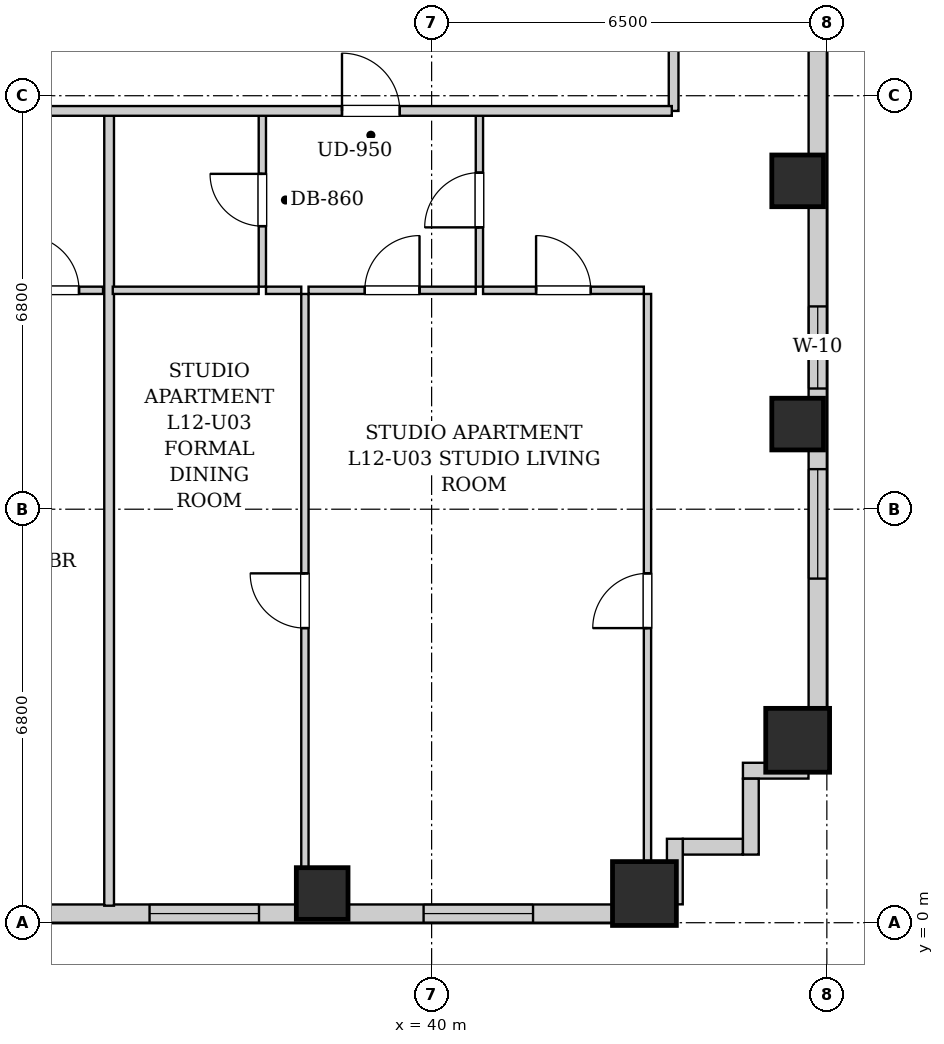
"""IFC4 building model, lengths in metres.
Left out: names, types, materials, properties, quantities, classifications, styles, units other than length and angle.
Written with IfcOpenShell. Run it as: python <this file> out.ifc"""

import sys

from ifc_helpers import new_model, si_unit, direction, frame, frame_2d, origin, origin_2d, place, context, subcontext, project, spatial, rectangle, extrude, element, fill, save


model = new_model("IFC4")
c1 = context("Model", 3, precision=1e-05, world=origin(), true_north=direction((0.0, 1.0)))
c2 = subcontext(c1, "Body", "Model", "MODEL_VIEW")
j1 = project(units=[si_unit("LENGTHUNIT", "METRE"), si_unit("PLANEANGLEUNIT", "RADIAN")], contexts=[c1])
p1 = place(None, origin())
s1 = spatial("IfcSite", under=j1, at=p1, CompositionType="ELEMENT")
p2 = place(p1, origin())
s2 = spatial("IfcBuilding", under=s1, at=p2, CompositionType="ELEMENT")
p3 = place(p2, frame((0.0, 0.0, 48.2)))
s3 = spatial("IfcBuildingStorey", under=s2, at=p3, CompositionType="ELEMENT", Elevation=48.2)
p4 = place(p3, frame((38.2, 0.48, 0.0), z_axis=(0.0, 0.0, 1.0), x_axis=(1.0, 0.0, 0.0)))
e1 = element("IfcColumn", 1, at=p4, inside=s3, PredefinedType="COLUMN", context=c2, shape_type="SweptSolid", body=[
    extrude(rectangle(XDim=0.85, YDim=0.85, at=origin_2d()), origin(), (0.0, 0.0, 1.0), 3.2),
])
for number, where, z_axis, x_axis in (
    (2, (43.5, 0.48, 0.0), (0.0, 0.0, 1.0), (1.0, 0.0, 0.0)),
    (3, (46.02, 3.0, 0.0), (0.0, 0.0, 1.0), (1.0, 0.0, 0.0)),
):
    element("IfcColumn", number, at=place(p3, frame(where, z_axis=z_axis, x_axis=x_axis)), inside=s3, PredefinedType="COLUMN", context=c2, shape_type="SweptSolid", body=[
        extrude(rectangle(XDim=1.05, YDim=1.05, at=origin_2d()), origin(), (0.0, 0.0, 1.0), 3.2),
    ])
for number, where, z_axis, x_axis in (
    (4, (46.02, 8.2, 0.0), (0.0, 0.0, 1.0), (1.0, 0.0, 0.0)),
    (5, (46.02, 12.2, 0.0), (0.0, 0.0, 1.0), (1.0, 0.0, 0.0)),
):
    element("IfcColumn", number, at=place(p3, frame(where, z_axis=z_axis, x_axis=x_axis)), inside=s3, PredefinedType="COLUMN", context=c2, shape_type="SweptSolid", body=[
        extrude(rectangle(XDim=0.85, YDim=0.85, at=origin_2d()), origin(), (0.0, 0.0, 1.0), 3.2),
    ])
p5 = place(p3, frame((46.35, 24.6, 0.0), z_axis=(0.0, 0.0, 1.0), x_axis=(0.0, -1.0, 0.0)))
e6 = element("IfcWall", 6, at=p5, inside=s3, PredefinedType="SOLIDWALL", context=c2, shape_type="SweptSolid", body=[
    extrude(rectangle(XDim=22.1, YDim=0.3, at=frame_2d((11.05, 0.0))), origin(), (0.0, 0.0, 1.0), 1.975),
])
p6 = place(p5, frame((17.141, 0.0, 0.55)))
e7 = element("IfcOpeningElement", 7, at=p6, cuts=e6, PredefinedType="OPENING", context=c2, shape_type="SweptSolid", body=[
    extrude(rectangle(XDim=1.8, YDim=1.2, at=frame_2d((0.9, 0.6))), frame((0.0, 0.16, 0.0), z_axis=(0.0, -1.0, 0.0), x_axis=(1.0, 0.0, 0.0)), (0.0, 0.0, 1.0), 0.32),
])
p7 = place(p5, frame((14.465, 0.0, 0.55)))
e8 = element("IfcOpeningElement", 8, at=p7, cuts=e6, PredefinedType="OPENING", context=c2, shape_type="SweptSolid", body=[
    extrude(rectangle(XDim=1.35, YDim=1.2, at=frame_2d((0.675, 0.6))), frame((0.0, 0.16, 0.0), z_axis=(0.0, -1.0, 0.0), x_axis=(1.0, 0.0, 0.0)), (0.0, 0.0, 1.0), 0.32),
])
p8 = place(p5, frame((5.1, 0.0, 0.55)))
e9 = element("IfcOpeningElement", 9, at=p8, cuts=e6, PredefinedType="OPENING", context=c2, shape_type="SweptSolid", body=[
    extrude(rectangle(XDim=1.8, YDim=1.2, at=frame_2d((0.9, 0.6))), frame((0.0, 0.16, 0.0), z_axis=(0.0, -1.0, 0.0), x_axis=(1.0, 0.0, 0.0)), (0.0, 0.0, 1.0), 0.32),
])
p9 = place(p5, frame((7.16, 0.0, 0.55)))
e10 = element("IfcOpeningElement", 10, at=p9, cuts=e6, PredefinedType="OPENING", context=c2, shape_type="SweptSolid", body=[
    extrude(rectangle(XDim=1.35, YDim=1.2, at=frame_2d((0.675, 0.6))), frame((0.0, 0.16, 0.0), z_axis=(0.0, -1.0, 0.0), x_axis=(1.0, 0.0, 0.0)), (0.0, 0.0, 1.0), 0.32),
])
p10 = place(p3, frame((44.0, 0.15, 0.0), z_axis=(0.0, 0.0, 1.0), x_axis=(-1.0, 0.0, 0.0)))
e11 = element("IfcWall", 11, at=p10, inside=s3, PredefinedType="SOLIDWALL", context=c2, shape_type="SweptSolid", body=[
    extrude(rectangle(XDim=26.15, YDim=0.3, at=frame_2d((13.075, 0.0))), origin(), (0.0, 0.0, 1.0), 1.975),
])
p11 = place(p10, frame((22.47, 0.0, 0.55)))
e12 = element("IfcOpeningElement", 12, at=p11, cuts=e11, PredefinedType="OPENING", context=c2, shape_type="SweptSolid", body=[
    extrude(rectangle(XDim=1.8, YDim=1.2, at=frame_2d((0.9, 0.6))), frame((0.0, 0.16, 0.0), z_axis=(0.0, -1.0, 0.0), x_axis=(1.0, 0.0, 0.0)), (0.0, 0.0, 1.0), 0.32),
])
p12 = place(p10, frame((14.354, 0.0, 0.55)))
e13 = element("IfcOpeningElement", 13, at=p12, cuts=e11, PredefinedType="OPENING", context=c2, shape_type="SweptSolid", body=[
    extrude(rectangle(XDim=1.8, YDim=1.2, at=frame_2d((0.9, 0.6))), frame((0.0, 0.16, 0.0), z_axis=(0.0, -1.0, 0.0), x_axis=(1.0, 0.0, 0.0)), (0.0, 0.0, 1.0), 0.32),
])
p13 = place(p10, frame((11.385, 0.0, 0.55)))
e14 = element("IfcOpeningElement", 14, at=p13, cuts=e11, PredefinedType="OPENING", context=c2, shape_type="SweptSolid", body=[
    extrude(rectangle(XDim=1.35, YDim=1.2, at=frame_2d((0.675, 0.6))), frame((0.0, 0.16, 0.0), z_axis=(0.0, -1.0, 0.0), x_axis=(1.0, 0.0, 0.0)), (0.0, 0.0, 1.0), 0.32),
])
p14 = place(p10, frame((6.839, 0.0, 0.55)))
e15 = element("IfcOpeningElement", 15, at=p14, cuts=e11, PredefinedType="OPENING", context=c2, shape_type="SweptSolid", body=[
    extrude(rectangle(XDim=1.8, YDim=1.2, at=frame_2d((0.9, 0.6))), frame((0.0, 0.16, 0.0), z_axis=(0.0, -1.0, 0.0), x_axis=(1.0, 0.0, 0.0)), (0.0, 0.0, 1.0), 0.32),
])
p15 = place(p10, frame((2.332, 0.0, 0.55)))
e16 = element("IfcOpeningElement", 16, at=p15, cuts=e11, PredefinedType="OPENING", context=c2, shape_type="SweptSolid", body=[
    extrude(rectangle(XDim=1.8, YDim=1.2, at=frame_2d((0.9, 0.6))), frame((0.0, 0.16, 0.0), z_axis=(0.0, -1.0, 0.0), x_axis=(1.0, 0.0, 0.0)), (0.0, 0.0, 1.0), 0.32),
])
p16 = place(p3, frame((46.198, 2.5, 0.0), z_axis=(0.0, 0.0, 1.0), x_axis=(-1.0, 0.0, 0.0)))
e17 = element("IfcWall", 17, at=p16, inside=s3, PredefinedType="SOLIDWALL", context=c2, shape_type="SweptSolid", body=[
    extrude(rectangle(XDim=1.078, YDim=0.26, at=frame_2d((0.539, 0.0))), origin(), (0.0, 0.0, 1.0), 2.94),
])
p17 = place(p3, frame((45.25, 2.368, 0.0), z_axis=(0.0, 0.0, 1.0), x_axis=(0.0, -1.0, 0.0)))
e18 = element("IfcWall", 18, at=p17, inside=s3, PredefinedType="SOLIDWALL", context=c2, shape_type="SweptSolid", body=[
    extrude(rectangle(XDim=1.248, YDim=0.26, at=frame_2d((0.624, 0.0))), origin(), (0.0, 0.0, 1.0), 2.94),
])
p18 = place(p3, frame((45.118, 1.25, 0.0), z_axis=(0.0, 0.0, 1.0), x_axis=(-1.0, 0.0, 0.0)))
e19 = element("IfcWall", 19, at=p18, inside=s3, PredefinedType="SOLIDWALL", context=c2, shape_type="SweptSolid", body=[
    extrude(rectangle(XDim=0.986, YDim=0.26, at=frame_2d((0.493, 0.0))), origin(), (0.0, 0.0, 1.0), 2.94),
])
p19 = place(p3, frame((44.0, 1.38, 0.0), z_axis=(0.0, 0.0, 1.0), x_axis=(0.0, -1.0, 0.0)))
e20 = element("IfcWall", 20, at=p19, inside=s3, PredefinedType="SOLIDWALL", context=c2, shape_type="SweptSolid", body=[
    extrude(rectangle(XDim=1.078, YDim=0.26, at=frame_2d((0.539, 0.0))), origin(), (0.0, 0.0, 1.0), 2.94),
])
p20 = place(p3, frame((43.98, 13.35, 0.0), z_axis=(0.0, 0.0, 1.0), x_axis=(0.0, 1.0, 0.0)))
e21 = element("IfcWall", 21, at=p20, inside=s3, PredefinedType="PARTITIONING", context=c2, shape_type="SweptSolid", body=[
    extrude(rectangle(XDim=1.74, YDim=0.16, at=frame_2d((0.87, 0.0))), origin(), (0.0, 0.0, 1.0), 2.94),
])
p21 = place(p3, frame((32.906, 10.4, 0.0), z_axis=(0.0, 0.0, 1.0), x_axis=(1.0, 0.0, 0.0)))
e22 = element("IfcWall", 22, at=p21, inside=s3, PredefinedType="PARTITIONING", context=c2, shape_type="SweptSolid", body=[
    extrude(rectangle(XDim=1.69, YDim=0.12, at=frame_2d((0.845, 0.0))), origin(), (0.0, 0.0, 1.0), 2.94),
])
p22 = place(p21, frame((0.395, 0.0, 0.0)))
e23 = element("IfcOpeningElement", 23, at=p22, cuts=e22, PredefinedType="OPENING", context=c2, shape_type="SweptSolid", body=[
    extrude(rectangle(XDim=0.9, YDim=2.05, at=frame_2d((0.45, 1.025))), frame((0.0, 0.07, 0.0), z_axis=(0.0, -1.0, 0.0), x_axis=(1.0, 0.0, 0.0)), (0.0, 0.0, 1.0), 0.14),
])
p23 = place(p3, frame((34.696, 0.28, 0.0), z_axis=(0.0, 0.0, 1.0), x_axis=(0.0, 1.0, 0.0)))
e24 = element("IfcWall", 24, at=p23, inside=s3, PredefinedType="PARTITIONING", context=c2, shape_type="SweptSolid", body=[
    extrude(rectangle(XDim=13.03, YDim=0.16, at=frame_2d((6.515, 0.0))), origin(), (0.0, 0.0, 1.0), 2.94),
])
p24 = place(p3, frame((37.216, 10.46, 0.0), z_axis=(0.0, 0.0, 1.0), x_axis=(0.0, 1.0, 0.0)))
e25 = element("IfcWall", 25, at=p24, inside=s3, PredefinedType="PARTITIONING", context=c2, shape_type="SweptSolid", body=[
    extrude(rectangle(XDim=2.85, YDim=0.12, at=frame_2d((1.425, 0.0))), origin(), (0.0, 0.0, 1.0), 2.94),
])
p25 = place(p24, frame((0.995, 0.0, 0.0)))
e26 = element("IfcOpeningElement", 26, at=p25, cuts=e25, PredefinedType="OPENING", context=c2, shape_type="SweptSolid", body=[
    extrude(rectangle(XDim=0.86, YDim=2.05, at=frame_2d((0.43, 1.025))), frame((0.0, 0.07, 0.0), z_axis=(0.0, -1.0, 0.0), x_axis=(1.0, 0.0, 0.0)), (0.0, 0.0, 1.0), 0.14),
])
p26 = place(p3, frame((34.756, 10.4, 0.0), z_axis=(0.0, 0.0, 1.0), x_axis=(1.0, 0.0, 0.0)))
e27 = element("IfcWall", 27, at=p26, inside=s3, PredefinedType="PARTITIONING", context=c2, shape_type="SweptSolid", body=[
    extrude(rectangle(XDim=2.4, YDim=0.12, at=frame_2d((1.2, 0.0))), origin(), (0.0, 0.0, 1.0), 2.94),
])
p27 = place(p3, frame((40.786, 10.46, 0.0), z_axis=(0.0, 0.0, 1.0), x_axis=(0.0, 1.0, 0.0)))
e28 = element("IfcWall", 28, at=p27, inside=s3, PredefinedType="PARTITIONING", context=c2, shape_type="SweptSolid", body=[
    extrude(rectangle(XDim=2.85, YDim=0.12, at=frame_2d((1.425, 0.0))), origin(), (0.0, 0.0, 1.0), 2.94),
])
p28 = place(p27, frame((0.975, 0.0, 0.0)))
e29 = element("IfcOpeningElement", 29, at=p28, cuts=e28, PredefinedType="OPENING", context=c2, shape_type="SweptSolid", body=[
    extrude(rectangle(XDim=0.9, YDim=2.05, at=frame_2d((0.45, 1.025))), frame((0.0, 0.07, 0.0), z_axis=(0.0, -1.0, 0.0), x_axis=(1.0, 0.0, 0.0)), (0.0, 0.0, 1.0), 0.14),
])
p29 = place(p3, frame((37.276, 10.4, 0.0), z_axis=(0.0, 0.0, 1.0), x_axis=(1.0, 0.0, 0.0)))
e30 = element("IfcWall", 30, at=p29, inside=s3, PredefinedType="PARTITIONING", context=c2, shape_type="SweptSolid", body=[
    extrude(rectangle(XDim=0.58, YDim=0.12, at=frame_2d((0.29, 0.0))), origin(), (0.0, 0.0, 1.0), 2.94),
])
p30 = place(p3, frame((37.976, 10.4, 0.0), z_axis=(0.0, 0.0, 1.0), x_axis=(1.0, 0.0, 0.0)))
e31 = element("IfcWall", 31, at=p30, inside=s3, PredefinedType="PARTITIONING", context=c2, shape_type="SweptSolid", body=[
    extrude(rectangle(XDim=2.75, YDim=0.12, at=frame_2d((1.375, 0.0))), origin(), (0.0, 0.0, 1.0), 2.94),
])
p31 = place(p30, frame((0.925, 0.0, 0.0)))
e32 = element("IfcOpeningElement", 32, at=p31, cuts=e31, PredefinedType="OPENING", context=c2, shape_type="SweptSolid", body=[
    extrude(rectangle(XDim=0.9, YDim=2.05, at=frame_2d((0.45, 1.025))), frame((0.0, 0.07, 0.0), z_axis=(0.0, -1.0, 0.0), x_axis=(1.0, 0.0, 0.0)), (0.0, 0.0, 1.0), 0.14),
])
p32 = place(p3, frame((40.846, 10.4, 0.0), z_axis=(0.0, 0.0, 1.0), x_axis=(1.0, 0.0, 0.0)))
e33 = element("IfcWall", 33, at=p32, inside=s3, PredefinedType="PARTITIONING", context=c2, shape_type="SweptSolid", body=[
    extrude(rectangle(XDim=2.644, YDim=0.12, at=frame_2d((1.322, 0.0))), origin(), (0.0, 0.0, 1.0), 2.94),
])
p33 = place(p32, frame((0.872, 0.0, 0.0)))
e34 = element("IfcOpeningElement", 34, at=p33, cuts=e33, PredefinedType="OPENING", context=c2, shape_type="SweptSolid", body=[
    extrude(rectangle(XDim=0.9, YDim=2.05, at=frame_2d((0.45, 1.025))), frame((0.0, 0.07, 0.0), z_axis=(0.0, -1.0, 0.0), x_axis=(1.0, 0.0, 0.0)), (0.0, 0.0, 1.0), 0.14),
])
p34 = place(p3, frame((37.916, 0.28, 0.0), z_axis=(0.0, 0.0, 1.0), x_axis=(0.0, 1.0, 0.0)))
e35 = element("IfcWall", 35, at=p34, inside=s3, PredefinedType="PARTITIONING", context=c2, shape_type="SweptSolid", body=[
    extrude(rectangle(XDim=10.06, YDim=0.12, at=frame_2d((5.03, 0.0))), origin(), (0.0, 0.0, 1.0), 2.94),
])
p35 = place(p34, frame((4.565, 0.0, 0.0)))
e36 = element("IfcOpeningElement", 36, at=p35, cuts=e35, PredefinedType="OPENING", context=c2, shape_type="SweptSolid", body=[
    extrude(rectangle(XDim=0.9, YDim=2.05, at=frame_2d((0.45, 1.025))), frame((0.0, 0.07, 0.0), z_axis=(0.0, -1.0, 0.0), x_axis=(1.0, 0.0, 0.0)), (0.0, 0.0, 1.0), 0.14),
])
p36 = place(p3, frame((43.55, 0.28, 0.0), z_axis=(0.0, 0.0, 1.0), x_axis=(0.0, 1.0, 0.0)))
e37 = element("IfcWall", 37, at=p36, inside=s3, PredefinedType="PARTITIONING", context=c2, shape_type="SweptSolid", body=[
    extrude(rectangle(XDim=10.06, YDim=0.12, at=frame_2d((5.03, 0.0))), origin(), (0.0, 0.0, 1.0), 2.94),
])
p37 = place(p36, frame((4.565, 0.0, 0.0)))
e38 = element("IfcOpeningElement", 38, at=p37, cuts=e37, PredefinedType="OPENING", context=c2, shape_type="SweptSolid", body=[
    extrude(rectangle(XDim=0.9, YDim=2.05, at=frame_2d((0.45, 1.025))), frame((0.0, 0.07, 0.0), z_axis=(0.0, -1.0, 0.0), x_axis=(1.0, 0.0, 0.0)), (0.0, 0.0, 1.0), 0.14),
])
p38 = place(p3, frame((10.05, 13.35, 0.0), z_axis=(0.0, 0.0, 1.0), x_axis=(1.0, 0.0, 0.0)))
e39 = element("IfcWall", 39, at=p38, inside=s3, PredefinedType="PARTITIONING", context=c2, shape_type="SweptSolid", body=[
    extrude(rectangle(XDim=33.9, YDim=0.16, at=frame_2d((16.95, 0.0))), origin(), (0.0, 0.0, 1.0), 2.94),
])
p39 = place(p38, frame((3.203, 0.0, 0.0)))
e40 = element("IfcOpeningElement", 40, at=p39, cuts=e39, PredefinedType="OPENING", context=c2, shape_type="SweptSolid", body=[
    extrude(rectangle(XDim=0.95, YDim=2.1, at=frame_2d((0.475, 1.05))), frame((0.0, 0.09, 0.0), z_axis=(0.0, -1.0, 0.0), x_axis=(1.0, 0.0, 0.0)), (0.0, 0.0, 1.0), 0.18),
])
p40 = place(p38, frame((9.39, 0.0, 0.0)))
e41 = element("IfcOpeningElement", 41, at=p40, cuts=e39, PredefinedType="OPENING", context=c2, shape_type="SweptSolid", body=[
    extrude(rectangle(XDim=0.95, YDim=2.1, at=frame_2d((0.475, 1.05))), frame((0.0, 0.09, 0.0), z_axis=(0.0, -1.0, 0.0), x_axis=(1.0, 0.0, 0.0)), (0.0, 0.0, 1.0), 0.18),
])
p41 = place(p38, frame((28.476, 0.0, 0.0)))
e42 = element("IfcOpeningElement", 42, at=p41, cuts=e39, PredefinedType="OPENING", context=c2, shape_type="SweptSolid", body=[
    extrude(rectangle(XDim=0.95, YDim=2.1, at=frame_2d((0.475, 1.05))), frame((0.0, 0.09, 0.0), z_axis=(0.0, -1.0, 0.0), x_axis=(1.0, 0.0, 0.0)), (0.0, 0.0, 1.0), 0.18),
])
p42 = place(p22, origin())
e43 = element("IfcDoor", 43, at=p42, inside=s3, OperationType="SINGLE_SWING_LEFT", PredefinedType="DOOR", context=c2, shape_type="SweptSolid", body=[
    extrude(rectangle(XDim=0.9, YDim=2.05, at=frame_2d((0.45, 1.025))), frame((0.0, 0.025, 0.0), z_axis=(0.0, -1.0, 0.0), x_axis=(1.0, 0.0, 0.0)), (0.0, 0.0, 1.0), 0.05),
])
fill(e23, e43)
p43 = place(p25, origin())
e44 = element("IfcDoor", 44, at=p43, inside=s3, OperationType="SINGLE_SWING_RIGHT", PredefinedType="DOOR", context=c2, shape_type="SweptSolid", body=[
    extrude(rectangle(XDim=0.86, YDim=2.05, at=frame_2d((0.43, 1.025))), frame((0.0, 0.025, 0.0), z_axis=(0.0, -1.0, 0.0), x_axis=(1.0, 0.0, 0.0)), (0.0, 0.0, 1.0), 0.05),
])
fill(e26, e44)
p44 = place(p28, origin())
e45 = element("IfcDoor", 45, at=p44, inside=s3, OperationType="SINGLE_SWING_LEFT", PredefinedType="DOOR", context=c2, shape_type="SweptSolid", body=[
    extrude(rectangle(XDim=0.9, YDim=2.05, at=frame_2d((0.45, 1.025))), frame((0.0, 0.025, 0.0), z_axis=(0.0, -1.0, 0.0), x_axis=(1.0, 0.0, 0.0)), (0.0, 0.0, 1.0), 0.05),
])
fill(e29, e45)
p45 = place(p31, origin())
e46 = element("IfcDoor", 46, at=p45, inside=s3, OperationType="SINGLE_SWING_RIGHT", PredefinedType="DOOR", context=c2, shape_type="SweptSolid", body=[
    extrude(rectangle(XDim=0.9, YDim=2.05, at=frame_2d((0.45, 1.025))), frame((0.0, 0.025, 0.0), z_axis=(0.0, -1.0, 0.0), x_axis=(1.0, 0.0, 0.0)), (0.0, 0.0, 1.0), 0.05),
])
fill(e32, e46)
p46 = place(p33, origin())
e47 = element("IfcDoor", 47, at=p46, inside=s3, OperationType="SINGLE_SWING_LEFT", PredefinedType="DOOR", context=c2, shape_type="SweptSolid", body=[
    extrude(rectangle(XDim=0.9, YDim=2.05, at=frame_2d((0.45, 1.025))), frame((0.0, 0.025, 0.0), z_axis=(0.0, -1.0, 0.0), x_axis=(1.0, 0.0, 0.0)), (0.0, 0.0, 1.0), 0.05),
])
fill(e34, e47)
p47 = place(p35, origin())
e48 = element("IfcDoor", 48, at=p47, inside=s3, OperationType="SINGLE_SWING_RIGHT", PredefinedType="DOOR", context=c2, shape_type="SweptSolid", body=[
    extrude(rectangle(XDim=0.9, YDim=2.05, at=frame_2d((0.45, 1.025))), frame((0.0, 0.025, 0.0), z_axis=(0.0, -1.0, 0.0), x_axis=(1.0, 0.0, 0.0)), (0.0, 0.0, 1.0), 0.05),
])
fill(e36, e48)
p48 = place(p37, origin())
e49 = element("IfcDoor", 49, at=p48, inside=s3, OperationType="SINGLE_SWING_LEFT", PredefinedType="DOOR", context=c2, shape_type="SweptSolid", body=[
    extrude(rectangle(XDim=0.9, YDim=2.05, at=frame_2d((0.45, 1.025))), frame((0.0, 0.025, 0.0), z_axis=(0.0, -1.0, 0.0), x_axis=(1.0, 0.0, 0.0)), (0.0, 0.0, 1.0), 0.05),
])
fill(e38, e49)
p49 = place(p41, origin())
e50 = element("IfcDoor", 50, at=p49, inside=s3, OperationType="SINGLE_SWING_LEFT", PredefinedType="DOOR", context=c2, shape_type="SweptSolid", body=[
    extrude(rectangle(XDim=0.95, YDim=2.1, at=frame_2d((0.475, 1.05))), frame((0.0, 0.025, 0.0), z_axis=(0.0, -1.0, 0.0), x_axis=(1.0, 0.0, 0.0)), (0.0, 0.0, 1.0), 0.05),
])
fill(e42, e50)
p50 = place(p14, origin())
e51 = element("IfcWindow", 51, at=p50, inside=s3, PartitioningType="DOUBLE_PANEL_VERTICAL", PredefinedType="WINDOW", context=c2, shape_type="SweptSolid", body=[
    extrude(rectangle(XDim=1.8, YDim=1.2, at=frame_2d((0.9, 0.6))), frame((0.0, 0.03, 0.0), z_axis=(0.0, -1.0, 0.0), x_axis=(1.0, 0.0, 0.0)), (0.0, 0.0, 1.0), 0.06),
])
fill(e15, e51)
p51 = place(p15, origin())
e52 = element("IfcWindow", 52, at=p51, inside=s3, PartitioningType="DOUBLE_PANEL_VERTICAL", PredefinedType="WINDOW", context=c2, shape_type="SweptSolid", body=[
    extrude(rectangle(XDim=1.8, YDim=1.2, at=frame_2d((0.9, 0.6))), frame((0.0, 0.03, 0.0), z_axis=(0.0, -1.0, 0.0), x_axis=(1.0, 0.0, 0.0)), (0.0, 0.0, 1.0), 0.06),
])
fill(e16, e52)
p52 = place(p6, origin())
e53 = element("IfcWindow", 53, at=p52, inside=s3, PartitioningType="DOUBLE_PANEL_VERTICAL", PredefinedType="WINDOW", context=c2, shape_type="SweptSolid", body=[
    extrude(rectangle(XDim=1.8, YDim=1.2, at=frame_2d((0.9, 0.6))), frame((0.0, 0.03, 0.0), z_axis=(0.0, -1.0, 0.0), x_axis=(1.0, 0.0, 0.0)), (0.0, 0.0, 1.0), 0.06),
])
fill(e7, e53)
p53 = place(p7, origin())
e54 = element("IfcWindow", 54, at=p53, inside=s3, PartitioningType="SINGLE_PANEL", PredefinedType="WINDOW", context=c2, shape_type="SweptSolid", body=[
    extrude(rectangle(XDim=1.35, YDim=1.2, at=frame_2d((0.675, 0.6))), frame((0.0, 0.03, 0.0), z_axis=(0.0, -1.0, 0.0), x_axis=(1.0, 0.0, 0.0)), (0.0, 0.0, 1.0), 0.06),
])
fill(e8, e54)
save(model, sys.argv[1])
